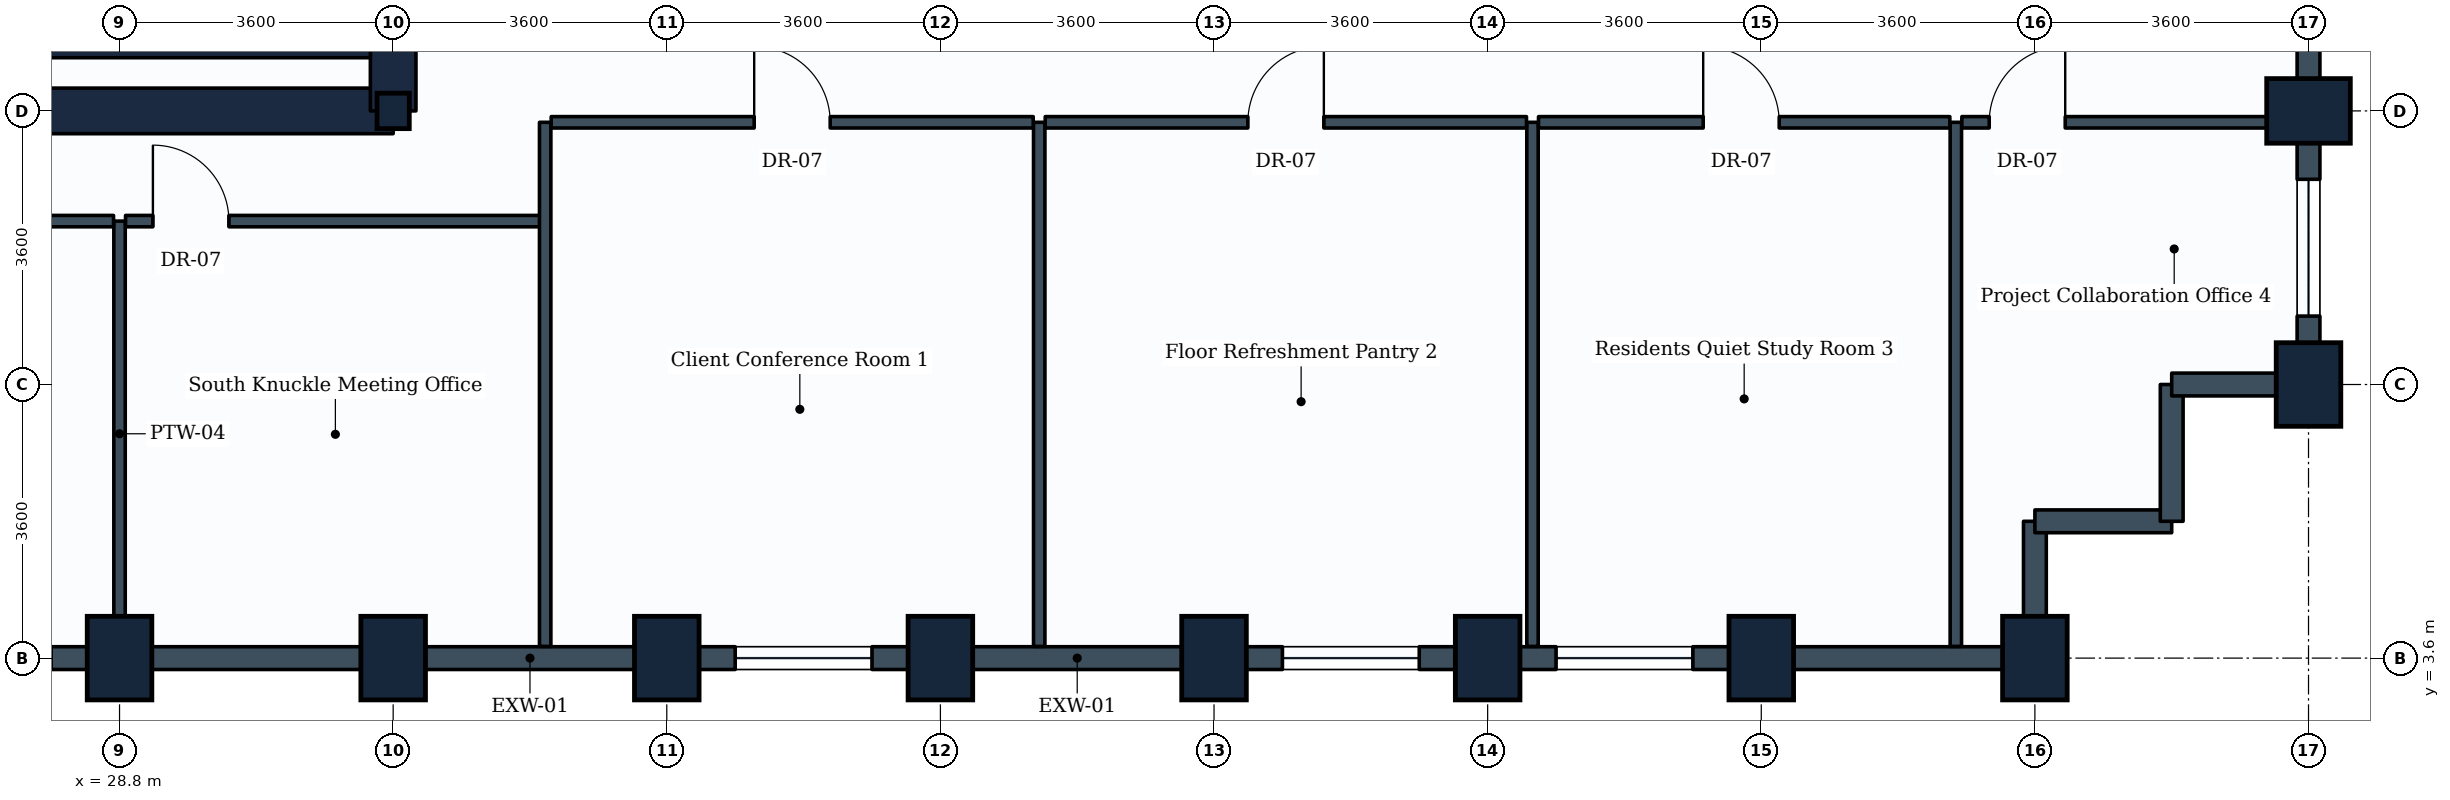
"""IFC4 building model, lengths in metres.
Left out: names, types, materials, properties, quantities, classifications, styles, units other than length and angle.
Written with IfcOpenShell. Run it as: python <this file> out.ifc"""

import sys

from ifc_helpers import new_model, si_unit, direction, frame, frame_2d, origin, origin_2d, place, context, subcontext, project, spatial, rectangle, i_section, extrude, element, fill, save


model = new_model("IFC4")
c1 = context("Model", 3, precision=1e-05, world=origin(), true_north=direction((0.0, 1.0)))
c2 = subcontext(c1, "Body", "Model", "MODEL_VIEW")
j1 = project(units=[si_unit("LENGTHUNIT", "METRE"), si_unit("PLANEANGLEUNIT", "RADIAN")], contexts=[c1])
p1 = place(None, origin())
s1 = spatial("IfcSite", under=j1, at=p1, CompositionType="ELEMENT")
p2 = place(p1, origin())
s2 = spatial("IfcBuilding", under=s1, at=p2, CompositionType="ELEMENT")
p3 = place(p2, frame((0.0, 0.0, 87.9)))
s3 = spatial("IfcBuildingStorey", under=s2, at=p3, CompositionType="ELEMENT", Elevation=87.9)
for number, where, z_axis, x_axis in (
    (1, (28.8, 3.6, 0.0), (0.0, 0.0, 1.0), (1.0, 0.0, 0.0)),
    (2, (32.4, 3.6, 0.0), (0.0, 0.0, 1.0), (1.0, 0.0, 0.0)),
):
    element("IfcColumn", number, at=place(p3, frame(where, z_axis=z_axis, x_axis=x_axis)), inside=s3, PredefinedType="COLUMN", context=c2, shape_type="SweptSolid", body=[
        extrude(rectangle(XDim=0.85, YDim=1.1, at=origin_2d()), origin(), (0.0, 0.0, 1.0), 3.9),
    ])
p4 = place(p3, frame((32.4, 10.8, 0.0), z_axis=(0.0, 0.0, 1.0), x_axis=(1.0, 0.0, 0.0)))
e3 = element("IfcColumn", 3, at=p4, inside=s3, PredefinedType="COLUMN", context=c2, shape_type="SweptSolid", body=[
    extrude(i_section(OverallWidth=0.424, OverallDepth=0.467, WebThickness=0.033, FlangeThickness=0.053, FilletRadius=0.015, at=origin_2d()), origin(), (0.0, 0.0, 1.0), 3.9),
])
for number, where, z_axis, x_axis in (
    (4, (36.0, 3.6, 0.0), (0.0, 0.0, 1.0), (1.0, 0.0, 0.0)),
    (5, (39.6, 3.6, 0.0), (0.0, 0.0, 1.0), (1.0, 0.0, 0.0)),
    (6, (43.2, 3.6, 0.0), (0.0, 0.0, 1.0), (1.0, 0.0, 0.0)),
    (7, (46.8, 3.6, 0.0), (0.0, 0.0, 1.0), (1.0, 0.0, 0.0)),
    (8, (50.4, 3.6, 0.0), (0.0, 0.0, 1.0), (1.0, 0.0, 0.0)),
    (9, (54.0, 3.6, 0.0), (0.0, 0.0, 1.0), (1.0, 0.0, 0.0)),
    (10, (57.6, 7.2, 0.0), (0.0, 0.0, 1.0), (1.0, 0.0, 0.0)),
    (11, (57.6, 10.8, 0.0), (0.0, 0.0, 1.0), (0.0, 1.0, 0.0)),
):
    element("IfcColumn", number, at=place(p3, frame(where, z_axis=z_axis, x_axis=x_axis)), inside=s3, PredefinedType="COLUMN", context=c2, shape_type="SweptSolid", body=[
        extrude(rectangle(XDim=0.85, YDim=1.1, at=origin_2d()), origin(), (0.0, 0.0, 1.0), 3.9),
    ])
p5 = place(p3, frame((28.8, 3.6, 0.0), z_axis=(0.0, 0.0, 1.0), x_axis=(-1.0, 0.0, 0.0)))
e12 = element("IfcWall", 12, at=p5, inside=s3, PredefinedType="STANDARD", context=c2, shape_type="SweptSolid", body=[
    extrude(rectangle(XDim=3.6, YDim=0.3, at=frame_2d((1.8, 0.0))), origin(), (0.0, 0.0, 1.0), 2.93),
])
p6 = place(p5, frame((0.9, 0.0, 0.85)))
e13 = element("IfcOpeningElement", 13, at=p6, cuts=e12, PredefinedType="OPENING", context=c2, shape_type="SweptSolid", body=[
    extrude(rectangle(XDim=1.8, YDim=1.35, at=frame_2d((0.9, 0.675))), frame((0.0, 0.16, 0.0), z_axis=(0.0, -1.0, 0.0), x_axis=(1.0, 0.0, 0.0)), (0.0, 0.0, 1.0), 0.32),
])
p7 = place(p3, frame((32.4, 3.6, 0.0), z_axis=(0.0, 0.0, 1.0), x_axis=(-1.0, 0.0, 0.0)))
e14 = element("IfcWall", 14, at=p7, inside=s3, PredefinedType="STANDARD", context=c2, shape_type="SweptSolid", body=[
    extrude(rectangle(XDim=3.6, YDim=0.3, at=frame_2d((1.8, 0.0))), origin(), (0.0, 0.0, 1.0), 2.93),
])
p8 = place(p3, frame((36.0, 3.6, 0.0), z_axis=(0.0, 0.0, 1.0), x_axis=(-1.0, 0.0, 0.0)))
e15 = element("IfcWall", 15, at=p8, inside=s3, PredefinedType="STANDARD", context=c2, shape_type="SweptSolid", body=[
    extrude(rectangle(XDim=3.6, YDim=0.3, at=frame_2d((1.8, 0.0))), origin(), (0.0, 0.0, 1.0), 2.93),
])
p9 = place(p3, frame((39.6, 3.6, 0.0), z_axis=(0.0, 0.0, 1.0), x_axis=(-1.0, 0.0, 0.0)))
e16 = element("IfcWall", 16, at=p9, inside=s3, PredefinedType="STANDARD", context=c2, shape_type="SweptSolid", body=[
    extrude(rectangle(XDim=3.6, YDim=0.3, at=frame_2d((1.8, 0.0))), origin(), (0.0, 0.0, 1.0), 2.93),
])
p10 = place(p9, frame((0.9, 0.0, 0.85)))
e17 = element("IfcOpeningElement", 17, at=p10, cuts=e16, PredefinedType="OPENING", context=c2, shape_type="SweptSolid", body=[
    extrude(rectangle(XDim=1.8, YDim=1.35, at=frame_2d((0.9, 0.675))), frame((0.0, 0.16, 0.0), z_axis=(0.0, -1.0, 0.0), x_axis=(1.0, 0.0, 0.0)), (0.0, 0.0, 1.0), 0.32),
])
p11 = place(p3, frame((43.2, 3.6, 0.0), z_axis=(0.0, 0.0, 1.0), x_axis=(-1.0, 0.0, 0.0)))
e18 = element("IfcWall", 18, at=p11, inside=s3, PredefinedType="STANDARD", context=c2, shape_type="SweptSolid", body=[
    extrude(rectangle(XDim=3.6, YDim=0.3, at=frame_2d((1.8, 0.0))), origin(), (0.0, 0.0, 1.0), 2.93),
])
p12 = place(p3, frame((46.8, 3.6, 0.0), z_axis=(0.0, 0.0, 1.0), x_axis=(-1.0, 0.0, 0.0)))
e19 = element("IfcWall", 19, at=p12, inside=s3, PredefinedType="STANDARD", context=c2, shape_type="SweptSolid", body=[
    extrude(rectangle(XDim=3.6, YDim=0.3, at=frame_2d((1.8, 0.0))), origin(), (0.0, 0.0, 1.0), 2.93),
])
p13 = place(p12, frame((0.9, 0.0, 0.85)))
e20 = element("IfcOpeningElement", 20, at=p13, cuts=e19, PredefinedType="OPENING", context=c2, shape_type="SweptSolid", body=[
    extrude(rectangle(XDim=1.8, YDim=1.35, at=frame_2d((0.9, 0.675))), frame((0.0, 0.16, 0.0), z_axis=(0.0, -1.0, 0.0), x_axis=(1.0, 0.0, 0.0)), (0.0, 0.0, 1.0), 0.32),
])
p14 = place(p3, frame((50.4, 3.6, 0.0), z_axis=(0.0, 0.0, 1.0), x_axis=(-1.0, 0.0, 0.0)))
e21 = element("IfcWall", 21, at=p14, inside=s3, PredefinedType="STANDARD", context=c2, shape_type="SweptSolid", body=[
    extrude(rectangle(XDim=3.6, YDim=0.3, at=frame_2d((1.8, 0.0))), origin(), (0.0, 0.0, 1.0), 2.93),
])
p15 = place(p14, frame((0.9, 0.0, 0.85)))
e22 = element("IfcOpeningElement", 22, at=p15, cuts=e21, PredefinedType="OPENING", context=c2, shape_type="SweptSolid", body=[
    extrude(rectangle(XDim=1.8, YDim=1.35, at=frame_2d((0.9, 0.675))), frame((0.0, 0.16, 0.0), z_axis=(0.0, -1.0, 0.0), x_axis=(1.0, 0.0, 0.0)), (0.0, 0.0, 1.0), 0.32),
])
p16 = place(p3, frame((54.0, 3.6, 0.0), z_axis=(0.0, 0.0, 1.0), x_axis=(-1.0, 0.0, 0.0)))
e23 = element("IfcWall", 23, at=p16, inside=s3, PredefinedType="STANDARD", context=c2, shape_type="SweptSolid", body=[
    extrude(rectangle(XDim=3.6, YDim=0.3, at=frame_2d((1.8, 0.0))), origin(), (0.0, 0.0, 1.0), 2.93),
])
p17 = place(p3, frame((54.0, 5.4, 0.0), z_axis=(0.0, 0.0, 1.0), x_axis=(0.0, -1.0, 0.0)))
e24 = element("IfcWall", 24, at=p17, inside=s3, PredefinedType="STANDARD", context=c2, shape_type="SweptSolid", body=[
    extrude(rectangle(XDim=1.8, YDim=0.3, at=frame_2d((0.9, 0.0))), origin(), (0.0, 0.0, 1.0), 2.93),
])
for number, where, z_axis, x_axis in (
    (25, (55.8, 5.4, 0.0), (0.0, 0.0, 1.0), (-1.0, 0.0, 0.0)),
    (26, (55.8, 7.2, 0.0), (0.0, 0.0, 1.0), (0.0, -1.0, 0.0)),
):
    element("IfcWall", number, at=place(p3, frame(where, z_axis=z_axis, x_axis=x_axis)), inside=s3, PredefinedType="STANDARD", context=c2, shape_type="SweptSolid", body=[
        extrude(rectangle(XDim=1.8, YDim=0.3, at=frame_2d((0.9, 0.0))), origin(), (0.0, 0.0, 1.0), 3.635),
    ])
p18 = place(p3, frame((57.6, 7.2, 0.0), z_axis=(0.0, 0.0, 1.0), x_axis=(-1.0, 0.0, 0.0)))
e27 = element("IfcWall", 27, at=p18, inside=s3, PredefinedType="STANDARD", context=c2, shape_type="SweptSolid", body=[
    extrude(rectangle(XDim=1.8, YDim=0.3, at=frame_2d((0.9, 0.0))), origin(), (0.0, 0.0, 1.0), 2.93),
])
p19 = place(p3, frame((57.6, 10.8, 0.0), z_axis=(0.0, 0.0, 1.0), x_axis=(0.0, -1.0, 0.0)))
e28 = element("IfcWall", 28, at=p19, inside=s3, PredefinedType="STANDARD", context=c2, shape_type="SweptSolid", body=[
    extrude(rectangle(XDim=3.6, YDim=0.3, at=frame_2d((1.8, 0.0))), origin(), (0.0, 0.0, 1.0), 2.93),
])
p20 = place(p19, frame((0.9, 0.0, 0.85)))
e29 = element("IfcOpeningElement", 29, at=p20, cuts=e28, PredefinedType="OPENING", context=c2, shape_type="SweptSolid", body=[
    extrude(rectangle(XDim=1.8, YDim=1.35, at=frame_2d((0.9, 0.675))), frame((0.0, 0.16, 0.0), z_axis=(0.0, -1.0, 0.0), x_axis=(1.0, 0.0, 0.0)), (0.0, 0.0, 1.0), 0.32),
])
p21 = place(p3, frame((57.6, 14.4, 0.0), z_axis=(0.0, 0.0, 1.0), x_axis=(0.0, -1.0, 0.0)))
e30 = element("IfcWall", 30, at=p21, inside=s3, PredefinedType="STANDARD", context=c2, shape_type="SweptSolid", body=[
    extrude(rectangle(XDim=3.6, YDim=0.3, at=frame_2d((1.8, 0.0))), origin(), (0.0, 0.0, 1.0), 2.93),
])
p22 = place(p3, frame((14.4, 10.8, 0.0), z_axis=(0.0, 0.0, 1.0), x_axis=(1.0, 0.0, 0.0)))
e31 = element("IfcWall", 31, at=p22, inside=s3, PredefinedType="SHEAR", context=c2, shape_type="SweptSolid", body=[
    extrude(rectangle(XDim=18.0, YDim=0.6, at=frame_2d((9.0, 0.0))), origin(), (0.0, 0.0, 1.0), 3.65),
])
p23 = place(p3, frame((32.4, 10.8, 0.0), z_axis=(0.0, 0.0, 1.0), x_axis=(0.0, 1.0, 0.0)))
e32 = element("IfcWall", 32, at=p23, inside=s3, PredefinedType="SHEAR", context=c2, shape_type="SweptSolid", body=[
    extrude(rectangle(XDim=14.4, YDim=0.6, at=frame_2d((7.2, 0.0))), origin(), (0.0, 0.0, 1.0), 3.65),
])
p24 = place(p23, frame((4.35, 0.0, 0.0)))
e33 = element("IfcOpeningElement", 33, at=p24, cuts=e32, PredefinedType="OPENING", context=c2, shape_type="SweptSolid", body=[
    extrude(rectangle(XDim=1.2, YDim=2.1, at=frame_2d((0.6, 1.05))), frame((0.0, 0.31, 0.0), z_axis=(0.0, -1.0, 0.0), x_axis=(1.0, 0.0, 0.0)), (0.0, 0.0, 1.0), 0.62),
])
p25 = place(p23, frame((10.0, 0.0, 0.0)))
e34 = element("IfcOpeningElement", 34, at=p25, cuts=e32, PredefinedType="OPENING", context=c2, shape_type="SweptSolid", body=[
    extrude(rectangle(XDim=1.2, YDim=2.1, at=frame_2d((0.6, 1.05))), frame((0.0, 0.31, 0.0), z_axis=(0.0, -1.0, 0.0), x_axis=(1.0, 0.0, 0.0)), (0.0, 0.0, 1.0), 0.62),
])
p26 = place(p3, frame((23.35, 11.625, 0.0), z_axis=(0.0, 0.0, 1.0), x_axis=(1.0, 0.0, 0.0)))
e35 = element("IfcWall", 35, at=p26, inside=s3, PredefinedType="SHEAR", context=c2, shape_type="SweptSolid", body=[
    extrude(rectangle(XDim=8.75, YDim=0.25, at=frame_2d((4.375, 0.0))), origin(), (0.0, 0.0, 1.0), 3.65),
])
p27 = place(p3, frame((28.8, 9.35, 0.0), z_axis=(0.0, 0.0, 1.0), x_axis=(0.0, -1.0, 0.0)))
e36 = element("IfcWall", 36, at=p27, inside=s3, PredefinedType="PARTITIONING", context=c2, shape_type="SweptSolid", body=[
    extrude(rectangle(XDim=5.596, YDim=0.15, at=frame_2d((2.798, 0.0))), origin(), (0.0, 0.0, 1.0), 3.635),
])
p28 = place(p3, frame((20.479, 9.35, 0.0), z_axis=(0.0, 0.0, 1.0), x_axis=(1.0, 0.0, 0.0)))
e37 = element("IfcWall", 37, at=p28, inside=s3, PredefinedType="PARTITIONING", context=c2, shape_type="SweptSolid", body=[
    extrude(rectangle(XDim=8.242, YDim=0.15, at=frame_2d((4.121, 0.0))), origin(), (0.0, 0.0, 1.0), 3.18),
])
p29 = place(p28, frame((3.939, 0.0, 0.0)))
e38 = element("IfcOpeningElement", 38, at=p29, cuts=e37, PredefinedType="OPENING", context=c2, shape_type="SweptSolid", body=[
    extrude(rectangle(XDim=1.0, YDim=2.1, at=frame_2d((0.5, 1.05))), frame((0.0, 0.085, 0.0), z_axis=(0.0, -1.0, 0.0), x_axis=(1.0, 0.0, 0.0)), (0.0, 0.0, 1.0), 0.17),
])
p30 = place(p3, frame((28.879, 9.35, 0.0), z_axis=(0.0, 0.0, 1.0), x_axis=(1.0, 0.0, 0.0)))
e39 = element("IfcWall", 39, at=p30, inside=s3, PredefinedType="PARTITIONING", context=c2, shape_type="SweptSolid", body=[
    extrude(rectangle(XDim=5.521, YDim=0.15, at=frame_2d((2.76, 0.0))), origin(), (0.0, 0.0, 1.0), 3.635),
])
p31 = place(p30, frame((0.36, 0.0, 0.0)))
e40 = element("IfcOpeningElement", 40, at=p31, cuts=e39, PredefinedType="OPENING", context=c2, shape_type="SweptSolid", body=[
    extrude(rectangle(XDim=1.0, YDim=2.1, at=frame_2d((0.5, 1.05))), frame((0.0, 0.085, 0.0), z_axis=(0.0, -1.0, 0.0), x_axis=(1.0, 0.0, 0.0)), (0.0, 0.0, 1.0), 0.17),
])
for number, where, z_axis, x_axis in (
    (41, (34.4, 3.754, 0.0), (0.0, 0.0, 1.0), (0.0, 1.0, 0.0)),
    (42, (40.9, 3.754, 0.0), (0.0, 0.0, 1.0), (0.0, 1.0, 0.0)),
):
    element("IfcWall", number, at=place(p3, frame(where, z_axis=z_axis, x_axis=x_axis)), inside=s3, PredefinedType="PARTITIONING", context=c2, shape_type="SweptSolid", body=[
        extrude(rectangle(XDim=6.896, YDim=0.15, at=frame_2d((3.448, 0.0))), origin(), (0.0, 0.0, 1.0), 2.93),
    ])
p32 = place(p3, frame((34.479, 10.65, 0.0), z_axis=(0.0, 0.0, 1.0), x_axis=(1.0, 0.0, 0.0)))
e43 = element("IfcWall", 43, at=p32, inside=s3, PredefinedType="PARTITIONING", context=c2, shape_type="SweptSolid", body=[
    extrude(rectangle(XDim=6.342, YDim=0.15, at=frame_2d((3.171, 0.0))), origin(), (0.0, 0.0, 1.0), 3.18),
])
p33 = place(p32, frame((2.671, 0.0, 0.0)))
e44 = element("IfcOpeningElement", 44, at=p33, cuts=e43, PredefinedType="OPENING", context=c2, shape_type="SweptSolid", body=[
    extrude(rectangle(XDim=1.0, YDim=2.1, at=frame_2d((0.5, 1.05))), frame((0.0, 0.085, 0.0), z_axis=(0.0, -1.0, 0.0), x_axis=(1.0, 0.0, 0.0)), (0.0, 0.0, 1.0), 0.17),
])
p34 = place(p3, frame((47.39, 3.754, 0.0), z_axis=(0.0, 0.0, 1.0), x_axis=(0.0, 1.0, 0.0)))
e45 = element("IfcWall", 45, at=p34, inside=s3, PredefinedType="PARTITIONING", context=c2, shape_type="SweptSolid", body=[
    extrude(rectangle(XDim=6.896, YDim=0.15, at=frame_2d((3.448, 0.0))), origin(), (0.0, 0.0, 1.0), 2.93),
])
p35 = place(p3, frame((40.979, 10.65, 0.0), z_axis=(0.0, 0.0, 1.0), x_axis=(1.0, 0.0, 0.0)))
e46 = element("IfcWall", 46, at=p35, inside=s3, PredefinedType="PARTITIONING", context=c2, shape_type="SweptSolid", body=[
    extrude(rectangle(XDim=6.332, YDim=0.15, at=frame_2d((3.166, 0.0))), origin(), (0.0, 0.0, 1.0), 3.18),
])
p36 = place(p35, frame((2.666, 0.0, 0.0)))
e47 = element("IfcOpeningElement", 47, at=p36, cuts=e46, PredefinedType="OPENING", context=c2, shape_type="SweptSolid", body=[
    extrude(rectangle(XDim=1.0, YDim=2.1, at=frame_2d((0.5, 1.05))), frame((0.0, 0.085, 0.0), z_axis=(0.0, -1.0, 0.0), x_axis=(1.0, 0.0, 0.0)), (0.0, 0.0, 1.0), 0.17),
])
p37 = place(p3, frame((52.96, 3.754, 0.0), z_axis=(0.0, 0.0, 1.0), x_axis=(0.0, 1.0, 0.0)))
e48 = element("IfcWall", 48, at=p37, inside=s3, PredefinedType="PARTITIONING", context=c2, shape_type="SweptSolid", body=[
    extrude(rectangle(XDim=6.896, YDim=0.15, at=frame_2d((3.448, 0.0))), origin(), (0.0, 0.0, 1.0), 2.93),
])
p38 = place(p3, frame((47.469, 10.65, 0.0), z_axis=(0.0, 0.0, 1.0), x_axis=(1.0, 0.0, 0.0)))
e49 = element("IfcWall", 49, at=p38, inside=s3, PredefinedType="PARTITIONING", context=c2, shape_type="SweptSolid", body=[
    extrude(rectangle(XDim=5.412, YDim=0.15, at=frame_2d((2.706, 0.0))), origin(), (0.0, 0.0, 1.0), 3.23),
])
p39 = place(p38, frame((2.167, 0.0, 0.0)))
e50 = element("IfcOpeningElement", 50, at=p39, cuts=e49, PredefinedType="OPENING", context=c2, shape_type="SweptSolid", body=[
    extrude(rectangle(XDim=1.0, YDim=2.1, at=frame_2d((0.5, 1.05))), frame((0.0, 0.085, 0.0), z_axis=(0.0, -1.0, 0.0), x_axis=(1.0, 0.0, 0.0)), (0.0, 0.0, 1.0), 0.17),
])
p40 = place(p3, frame((53.039, 10.65, 0.0), z_axis=(0.0, 0.0, 1.0), x_axis=(1.0, 0.0, 0.0)))
e51 = element("IfcWall", 51, at=p40, inside=s3, PredefinedType="PARTITIONING", context=c2, shape_type="SweptSolid", body=[
    extrude(rectangle(XDim=4.407, YDim=0.15, at=frame_2d((2.204, 0.0))), origin(), (0.0, 0.0, 1.0), 2.93),
])
p41 = place(p40, frame((0.36, 0.0, 0.0)))
e52 = element("IfcOpeningElement", 52, at=p41, cuts=e51, PredefinedType="OPENING", context=c2, shape_type="SweptSolid", body=[
    extrude(rectangle(XDim=1.0, YDim=2.1, at=frame_2d((0.5, 1.05))), frame((0.0, 0.085, 0.0), z_axis=(0.0, -1.0, 0.0), x_axis=(1.0, 0.0, 0.0)), (0.0, 0.0, 1.0), 0.17),
])
p42 = place(p10, origin())
e53 = element("IfcWindow", 53, at=p42, inside=s3, PartitioningType="SINGLE_PANEL", PredefinedType="WINDOW", context=c2, shape_type="SweptSolid", body=[
    extrude(rectangle(XDim=1.8, YDim=1.35, at=frame_2d((0.9, 0.675))), frame((0.0, 0.03, 0.0), z_axis=(0.0, -1.0, 0.0), x_axis=(1.0, 0.0, 0.0)), (0.0, 0.0, 1.0), 0.06),
])
fill(e17, e53)
p43 = place(p13, origin())
e54 = element("IfcWindow", 54, at=p43, inside=s3, PartitioningType="SINGLE_PANEL", PredefinedType="WINDOW", context=c2, shape_type="SweptSolid", body=[
    extrude(rectangle(XDim=1.8, YDim=1.35, at=frame_2d((0.9, 0.675))), frame((0.0, 0.03, 0.0), z_axis=(0.0, -1.0, 0.0), x_axis=(1.0, 0.0, 0.0)), (0.0, 0.0, 1.0), 0.06),
])
fill(e20, e54)
p44 = place(p15, origin())
e55 = element("IfcWindow", 55, at=p44, inside=s3, PartitioningType="SINGLE_PANEL", PredefinedType="WINDOW", context=c2, shape_type="SweptSolid", body=[
    extrude(rectangle(XDim=1.8, YDim=1.35, at=frame_2d((0.9, 0.675))), frame((0.0, 0.03, 0.0), z_axis=(0.0, -1.0, 0.0), x_axis=(1.0, 0.0, 0.0)), (0.0, 0.0, 1.0), 0.06),
])
fill(e22, e55)
p45 = place(p20, origin())
e56 = element("IfcWindow", 56, at=p45, inside=s3, PartitioningType="SINGLE_PANEL", PredefinedType="WINDOW", context=c2, shape_type="SweptSolid", body=[
    extrude(rectangle(XDim=1.8, YDim=1.35, at=frame_2d((0.9, 0.675))), frame((0.0, 0.03, 0.0), z_axis=(0.0, -1.0, 0.0), x_axis=(1.0, 0.0, 0.0)), (0.0, 0.0, 1.0), 0.06),
])
fill(e29, e56)
p46 = place(p31, origin())
e57 = element("IfcDoor", 57, at=p46, inside=s3, OperationType="SINGLE_SWING_LEFT", PredefinedType="DOOR", context=c2, shape_type="SweptSolid", body=[
    extrude(rectangle(XDim=1.0, YDim=2.1, at=frame_2d((0.5, 1.05))), frame((0.0, 0.025, 0.0), z_axis=(0.0, -1.0, 0.0), x_axis=(1.0, 0.0, 0.0)), (0.0, 0.0, 1.0), 0.05),
])
fill(e40, e57)
p47 = place(p33, origin())
e58 = element("IfcDoor", 58, at=p47, inside=s3, OperationType="SINGLE_SWING_LEFT", PredefinedType="DOOR", context=c2, shape_type="SweptSolid", body=[
    extrude(rectangle(XDim=1.0, YDim=2.1, at=frame_2d((0.5, 1.05))), frame((0.0, 0.025, 0.0), z_axis=(0.0, -1.0, 0.0), x_axis=(1.0, 0.0, 0.0)), (0.0, 0.0, 1.0), 0.05),
])
fill(e44, e58)
p48 = place(p36, origin())
e59 = element("IfcDoor", 59, at=p48, inside=s3, OperationType="SINGLE_SWING_RIGHT", PredefinedType="DOOR", context=c2, shape_type="SweptSolid", body=[
    extrude(rectangle(XDim=1.0, YDim=2.1, at=frame_2d((0.5, 1.05))), frame((0.0, 0.025, 0.0), z_axis=(0.0, -1.0, 0.0), x_axis=(1.0, 0.0, 0.0)), (0.0, 0.0, 1.0), 0.05),
])
fill(e47, e59)
p49 = place(p39, origin())
e60 = element("IfcDoor", 60, at=p49, inside=s3, OperationType="SINGLE_SWING_LEFT", PredefinedType="DOOR", context=c2, shape_type="SweptSolid", body=[
    extrude(rectangle(XDim=1.0, YDim=2.1, at=frame_2d((0.5, 1.05))), frame((0.0, 0.025, 0.0), z_axis=(0.0, -1.0, 0.0), x_axis=(1.0, 0.0, 0.0)), (0.0, 0.0, 1.0), 0.05),
])
fill(e50, e60)
p50 = place(p41, origin())
e61 = element("IfcDoor", 61, at=p50, inside=s3, OperationType="SINGLE_SWING_RIGHT", PredefinedType="DOOR", context=c2, shape_type="SweptSolid", body=[
    extrude(rectangle(XDim=1.0, YDim=2.1, at=frame_2d((0.5, 1.05))), frame((0.0, 0.025, 0.0), z_axis=(0.0, -1.0, 0.0), x_axis=(1.0, 0.0, 0.0)), (0.0, 0.0, 1.0), 0.05),
])
fill(e52, e61)
save(model, sys.argv[1])
